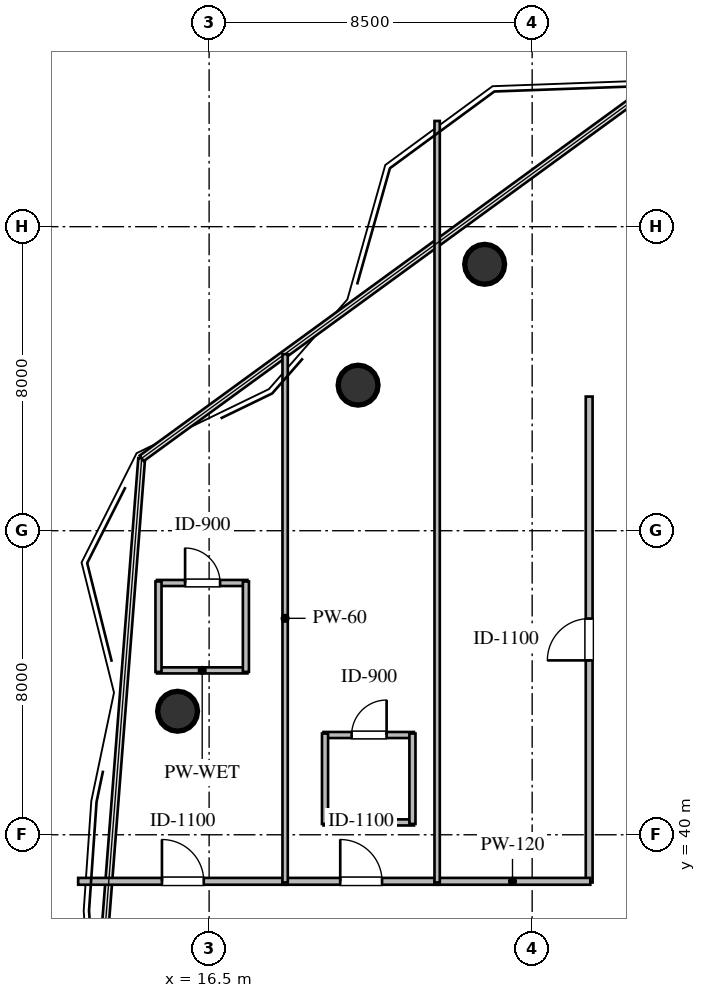
"""IFC4 building model, lengths in metres.
Left out: names, types, materials, properties, quantities, classifications, styles, units other than length and angle.
Written with IfcOpenShell. Run it as: python <this file> out.ifc"""

import sys

from ifc_helpers import new_model, si_unit, direction, frame, frame_2d, origin, origin_2d, place, context, subcontext, project, spatial, rectangle, circle, extrude, element, fill, save


model = new_model("IFC4")
c1 = context("Model", 3, precision=1e-05, world=origin(), true_north=direction((0.0, 1.0)))
c2 = subcontext(c1, "Body", "Model", "MODEL_VIEW")
j1 = project(units=[si_unit("LENGTHUNIT", "METRE"), si_unit("PLANEANGLEUNIT", "RADIAN")], contexts=[c1])
p1 = place(None, origin())
s1 = spatial("IfcSite", under=j1, at=p1, CompositionType="ELEMENT")
p2 = place(p1, origin())
s2 = spatial("IfcBuilding", under=s1, at=p2, CompositionType="ELEMENT")
p3 = place(p2, frame((0.0, 0.0, 206.4)))
s3 = spatial("IfcBuildingStorey", under=s2, at=p3, CompositionType="ELEMENT", Elevation=206.4)
for number, where, z_axis, x_axis in (
    (1, (23.75, 55.01, 0.0), (0.0, 0.0, 1.0), (1.0, 0.0, 0.0)),
    (2, (20.42, 51.83, 0.0), (0.0, 0.0, 1.0), (1.0, 0.0, 0.0)),
    (3, (15.67, 43.25, 0.0), (0.0, 0.0, 1.0), (1.0, 0.0, 0.0)),
):
    element("IfcColumn", number, at=place(p3, frame(where, z_axis=z_axis, x_axis=x_axis)), inside=s3, PredefinedType="COLUMN", context=c2, shape_type="SweptSolid", body=[
        extrude(circle(Radius=0.525, at=origin_2d()), origin(), (0.0, 0.0, 1.0), 3.6),
    ])
p4 = place(p3, frame((15.128, 44.325, 0.0), z_axis=(0.0, 0.0, 1.0), x_axis=(1.0, 0.0, 0.0)))
e4 = element("IfcWall", 4, at=p4, inside=s3, PredefinedType="PLUMBINGWALL", context=c2, shape_type="SweptSolid", body=[
    extrude(rectangle(XDim=2.38, YDim=0.16, at=frame_2d((1.19, 0.0))), origin(), (0.0, 0.0, 1.0), 3.36),
])
p5 = place(p3, frame((15.128, 46.625, 0.0), z_axis=(0.0, 0.0, 1.0), x_axis=(1.0, 0.0, 0.0)))
e5 = element("IfcWall", 5, at=p5, inside=s3, PredefinedType="PLUMBINGWALL", context=c2, shape_type="SweptSolid", body=[
    extrude(rectangle(XDim=2.38, YDim=0.16, at=frame_2d((1.19, 0.0))), origin(), (0.0, 0.0, 1.0), 3.36),
])
p6 = place(p5, frame((0.74, 0.0, 0.0)))
e6 = element("IfcOpeningElement", 6, at=p6, cuts=e5, PredefinedType="OPENING", context=c2, shape_type="SweptSolid", body=[
    extrude(rectangle(XDim=0.92, YDim=2.1, at=frame_2d((0.46, 1.05))), frame((0.0, 0.09, 0.0), z_axis=(0.0, -1.0, 0.0), x_axis=(1.0, 0.0, 0.0)), (0.0, 0.0, 1.0), 0.18),
])
for number, where, z_axis, x_axis in (
    (7, (15.168, 44.285, 0.0), (0.0, 0.0, 1.0), (0.0, 1.0, 0.0)),
    (8, (17.468, 44.285, 0.0), (0.0, 0.0, 1.0), (0.0, 1.0, 0.0)),
):
    element("IfcWall", number, at=place(p3, frame(where, z_axis=z_axis, x_axis=x_axis)), inside=s3, PredefinedType="PLUMBINGWALL", context=c2, shape_type="SweptSolid", body=[
        extrude(rectangle(XDim=2.38, YDim=0.16, at=frame_2d((1.19, 0.0))), origin(), (0.0, 0.0, 1.0), 3.36),
    ])
p7 = place(p3, frame((19.51, 40.325, 0.0), z_axis=(0.0, 0.0, 1.0), x_axis=(1.0, 0.0, 0.0)))
e9 = element("IfcWall", 9, at=p7, inside=s3, PredefinedType="PLUMBINGWALL", context=c2, shape_type="SweptSolid", body=[
    extrude(rectangle(XDim=2.38, YDim=0.16, at=frame_2d((1.19, 0.0))), origin(), (0.0, 0.0, 1.0), 3.36),
])
p8 = place(p3, frame((19.51, 42.625, 0.0), z_axis=(0.0, 0.0, 1.0), x_axis=(1.0, 0.0, 0.0)))
e10 = element("IfcWall", 10, at=p8, inside=s3, PredefinedType="PLUMBINGWALL", context=c2, shape_type="SweptSolid", body=[
    extrude(rectangle(XDim=2.38, YDim=0.16, at=frame_2d((1.19, 0.0))), origin(), (0.0, 0.0, 1.0), 3.36),
])
p9 = place(p8, frame((0.74, 0.0, 0.0)))
e11 = element("IfcOpeningElement", 11, at=p9, cuts=e10, PredefinedType="OPENING", context=c2, shape_type="SweptSolid", body=[
    extrude(rectangle(XDim=0.92, YDim=2.1, at=frame_2d((0.46, 1.05))), frame((0.0, 0.09, 0.0), z_axis=(0.0, -1.0, 0.0), x_axis=(1.0, 0.0, 0.0)), (0.0, 0.0, 1.0), 0.18),
])
p10 = place(p3, frame((19.55, 40.285, 0.0), z_axis=(0.0, 0.0, 1.0), x_axis=(0.0, 1.0, 0.0)))
e12 = element("IfcWall", 12, at=p10, inside=s3, PredefinedType="PLUMBINGWALL", context=c2, shape_type="SweptSolid", body=[
    extrude(rectangle(XDim=2.38, YDim=0.16, at=frame_2d((1.19, 0.0))), origin(), (0.0, 0.0, 1.0), 3.36),
])
p11 = place(p3, frame((21.85, 40.285, 0.0), z_axis=(0.0, 0.0, 1.0), x_axis=(0.0, 1.0, 0.0)))
e13 = element("IfcWall", 13, at=p11, inside=s3, PredefinedType="PLUMBINGWALL", context=c2, shape_type="SweptSolid", body=[
    extrude(rectangle(XDim=2.38, YDim=0.16, at=frame_2d((1.19, 0.0))), origin(), (0.0, 0.0, 1.0), 2.806),
])
p12 = place(p3, frame((13.054, 38.775, 0.0), z_axis=(0.0, 0.0, 1.0), x_axis=(1.0, 0.0, 0.0)))
e14 = element("IfcWall", 14, at=p12, inside=s3, PredefinedType="PARTITIONING", context=c2, shape_type="SweptSolid", body=[
    extrude(rectangle(XDim=5.511, YDim=0.18, at=frame_2d((2.755, 0.0))), origin(), (0.0, 0.0, 1.0), 3.36),
])
p13 = place(p12, frame((2.205, 0.0, 0.0)))
e15 = element("IfcOpeningElement", 15, at=p13, cuts=e14, PredefinedType="OPENING", context=c2, shape_type="SweptSolid", body=[
    extrude(rectangle(XDim=1.1, YDim=2.1, at=frame_2d((0.55, 1.05))), frame((0.0, 0.1, 0.0), z_axis=(0.0, -1.0, 0.0), x_axis=(1.0, 0.0, 0.0)), (0.0, 0.0, 1.0), 0.2),
])
p14 = place(p3, frame((18.435, 38.775, 0.0), z_axis=(0.0, 0.0, 1.0), x_axis=(1.0, 0.0, 0.0)))
e16 = element("IfcWall", 16, at=p14, inside=s3, PredefinedType="PARTITIONING", context=c2, shape_type="SweptSolid", body=[
    extrude(rectangle(XDim=4.13, YDim=0.18, at=frame_2d((2.065, 0.0))), origin(), (0.0, 0.0, 1.0), 3.36),
])
p15 = place(p14, frame((1.515, 0.0, 0.0)))
e17 = element("IfcOpeningElement", 17, at=p15, cuts=e16, PredefinedType="OPENING", context=c2, shape_type="SweptSolid", body=[
    extrude(rectangle(XDim=1.1, YDim=2.1, at=frame_2d((0.55, 1.05))), frame((0.0, 0.1, 0.0), z_axis=(0.0, -1.0, 0.0), x_axis=(1.0, 0.0, 0.0)), (0.0, 0.0, 1.0), 0.2),
])
p16 = place(p3, frame((26.5, 38.745, 0.0), z_axis=(0.0, 0.0, 1.0), x_axis=(0.0, 1.0, 0.0)))
e18 = element("IfcWall", 18, at=p16, inside=s3, PredefinedType="PARTITIONING", context=c2, shape_type="SweptSolid", body=[
    extrude(rectangle(XDim=12.785, YDim=0.18, at=frame_2d((6.393, 0.0))), origin(), (0.0, 0.0, 1.0), 3.36),
])
p17 = place(p16, frame((5.843, 0.0, 0.0)))
e19 = element("IfcOpeningElement", 19, at=p17, cuts=e18, PredefinedType="OPENING", context=c2, shape_type="SweptSolid", body=[
    extrude(rectangle(XDim=1.1, YDim=2.1, at=frame_2d((0.55, 1.05))), frame((0.0, 0.1, 0.0), z_axis=(0.0, -1.0, 0.0), x_axis=(1.0, 0.0, 0.0)), (0.0, 0.0, 1.0), 0.2),
])
p18 = place(p3, frame((22.435, 38.775, 0.0), z_axis=(0.0, 0.0, 1.0), x_axis=(1.0, 0.0, 0.0)))
e20 = element("IfcWall", 20, at=p18, inside=s3, PredefinedType="PARTITIONING", context=c2, shape_type="SweptSolid", body=[
    extrude(rectangle(XDim=4.095, YDim=0.18, at=frame_2d((2.047, 0.0))), origin(), (0.0, 0.0, 1.0), 3.36),
])
p19 = place(p3, frame((18.5, 52.645, 0.0), z_axis=(0.0, 0.0, 1.0), x_axis=(0.0, -1.0, 0.0)))
e21 = element("IfcWall", 21, at=p19, inside=s3, PredefinedType="PARTITIONING", context=c2, shape_type="SweptSolid", body=[
    extrude(rectangle(XDim=13.9, YDim=0.14, at=frame_2d((6.95, 0.0))), origin(), (0.0, 0.0, 1.0), 3.36),
])
p20 = place(p3, frame((22.5, 58.782, 0.0), z_axis=(0.0, 0.0, 1.0), x_axis=(0.0, -1.0, 0.0)))
e22 = element("IfcWall", 22, at=p20, inside=s3, PredefinedType="PARTITIONING", context=c2, shape_type="SweptSolid", body=[
    extrude(rectangle(XDim=20.037, YDim=0.14, at=frame_2d((10.019, 0.0))), origin(), (0.0, 0.0, 1.0), 2.806),
])
p21 = place(p6, origin())
e23 = element("IfcDoor", 23, at=p21, inside=s3, OperationType="SINGLE_SWING_LEFT", PredefinedType="DOOR", context=c2, shape_type="SweptSolid", body=[
    extrude(rectangle(XDim=0.92, YDim=2.1, at=frame_2d((0.46, 1.05))), frame((0.0, 0.025, 0.0), z_axis=(0.0, -1.0, 0.0), x_axis=(1.0, 0.0, 0.0)), (0.0, 0.0, 1.0), 0.05),
])
fill(e6, e23)
p22 = place(p9, origin())
e24 = element("IfcDoor", 24, at=p22, inside=s3, OperationType="SINGLE_SWING_RIGHT", PredefinedType="DOOR", context=c2, shape_type="SweptSolid", body=[
    extrude(rectangle(XDim=0.92, YDim=2.1, at=frame_2d((0.46, 1.05))), frame((0.0, 0.025, 0.0), z_axis=(0.0, -1.0, 0.0), x_axis=(1.0, 0.0, 0.0)), (0.0, 0.0, 1.0), 0.05),
])
fill(e11, e24)
p23 = place(p13, origin())
e25 = element("IfcDoor", 25, at=p23, inside=s3, OperationType="SINGLE_SWING_LEFT", PredefinedType="DOOR", context=c2, shape_type="SweptSolid", body=[
    extrude(rectangle(XDim=1.1, YDim=2.1, at=frame_2d((0.55, 1.05))), frame((0.0, 0.025, 0.0), z_axis=(0.0, -1.0, 0.0), x_axis=(1.0, 0.0, 0.0)), (0.0, 0.0, 1.0), 0.05),
])
fill(e15, e25)
p24 = place(p15, origin())
e26 = element("IfcDoor", 26, at=p24, inside=s3, OperationType="SINGLE_SWING_LEFT", PredefinedType="DOOR", context=c2, shape_type="SweptSolid", body=[
    extrude(rectangle(XDim=1.1, YDim=2.1, at=frame_2d((0.55, 1.05))), frame((0.0, 0.025, 0.0), z_axis=(0.0, -1.0, 0.0), x_axis=(1.0, 0.0, 0.0)), (0.0, 0.0, 1.0), 0.05),
])
fill(e17, e26)
p25 = place(p17, origin())
e27 = element("IfcDoor", 27, at=p25, inside=s3, OperationType="SINGLE_SWING_LEFT", PredefinedType="DOOR", context=c2, shape_type="SweptSolid", body=[
    extrude(rectangle(XDim=1.1, YDim=2.1, at=frame_2d((0.55, 1.05))), frame((0.0, 0.025, 0.0), z_axis=(0.0, -1.0, 0.0), x_axis=(1.0, 0.0, 0.0)), (0.0, 0.0, 1.0), 0.05),
])
fill(e19, e27)
save(model, sys.argv[1])
